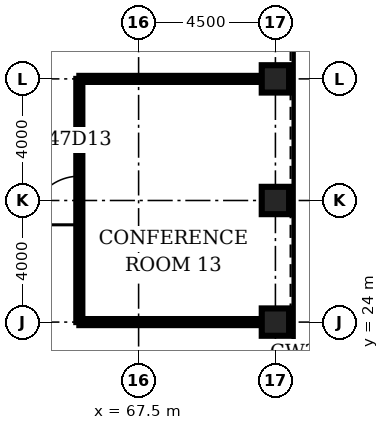
"""IFC4 building model, lengths in metres.
Left out: names, types, materials, properties, quantities, classifications, styles, units other than length and angle.
Written with IfcOpenShell. Run it as: python <this file> out.ifc"""

import sys

from ifc_helpers import new_model, si_unit, direction, frame, frame_2d, origin, origin_2d, place, context, subcontext, project, spatial, rectangle, hollow_rectangle, extrude, element, fill, save


model = new_model("IFC4")
c1 = context("Model", 3, precision=1e-05, world=origin(), true_north=direction((0.0, 1.0)))
c2 = subcontext(c1, "Body", "Model", "MODEL_VIEW")
j1 = project(units=[si_unit("LENGTHUNIT", "METRE"), si_unit("PLANEANGLEUNIT", "RADIAN")], contexts=[c1])
p1 = place(None, origin())
s1 = spatial("IfcSite", under=j1, at=p1, CompositionType="ELEMENT")
p2 = place(p1, origin())
s2 = spatial("IfcBuilding", under=s1, at=p2, CompositionType="ELEMENT")
p3 = place(p2, frame((0.0, 0.0, 211.0)))
s3 = spatial("IfcBuildingStorey", under=s2, at=p3, CompositionType="ELEMENT", Elevation=211.0)
for number, where, z_axis, x_axis in (
    (1, (72.0, 24.0, 0.0), (0.0, 0.0, 1.0), (1.0, 0.0, 0.0)),
    (2, (72.0, 28.0, 0.0), (0.0, 0.0, 1.0), (1.0, 0.0, 0.0)),
    (3, (72.0, 32.0, 0.0), (0.0, 0.0, 1.0), (1.0, 0.0, 0.0)),
):
    element("IfcColumn", number, at=place(p3, frame(where, z_axis=z_axis, x_axis=x_axis)), inside=s3, PredefinedType="COLUMN", context=c2, shape_type="SweptSolid", body=[
        extrude(hollow_rectangle(XDim=0.9, YDim=0.9, WallThickness=0.08, at=origin_2d()), origin(), (0.0, 0.0, 1.0), 4.2),
    ])
for number, where, z_axis, x_axis in (
    (4, (65.55, 24.0, 0.0), (0.0, 0.0, 1.0), (1.0, 0.0, 0.0)),
    (5, (65.55, 32.0, 0.0), (0.0, 0.0, 1.0), (1.0, 0.0, 0.0)),
):
    element("IfcWall", number, at=place(p3, frame(where, z_axis=z_axis, x_axis=x_axis)), inside=s3, PredefinedType="PARTITIONING", context=c2, shape_type="SweptSolid", body=[
        extrude(rectangle(XDim=6.0, YDim=0.2, at=frame_2d((3.0, 0.0))), origin(), (0.0, 0.0, 1.0), 3.0),
    ])
p4 = place(p3, frame((65.55, 24.0, 0.0), z_axis=(0.0, 0.0, 1.0), x_axis=(0.0, 1.0, 0.0)))
e6 = element("IfcWall", 6, at=p4, inside=s3, PredefinedType="PARTITIONING", context=c2, shape_type="SweptSolid", body=[
    extrude(rectangle(XDim=8.0, YDim=0.2, at=frame_2d((4.0, 0.0))), origin(), (0.0, 0.0, 1.0), 3.0),
])
p5 = place(p4, frame((3.2, 0.0, 0.0)))
e7 = element("IfcOpeningElement", 7, at=p5, cuts=e6, PredefinedType="OPENING", context=c2, shape_type="SweptSolid", body=[
    extrude(rectangle(XDim=1.6, YDim=2.1, at=frame_2d((0.8, 1.05))), frame((0.0, 0.11, 0.0), z_axis=(0.0, -1.0, 0.0), x_axis=(1.0, 0.0, 0.0)), (0.0, 0.0, 1.0), 0.22),
])
p6 = place(p5, origin())
e8 = element("IfcDoor", 8, at=p6, inside=s3, OperationType="SINGLE_SWING_LEFT", PredefinedType="DOOR", context=c2, shape_type="SweptSolid", body=[
    extrude(rectangle(XDim=1.6, YDim=2.1, at=frame_2d((0.8, 1.05))), frame((0.0, 0.025, 0.0), z_axis=(0.0, -1.0, 0.0), x_axis=(1.0, 0.0, 0.0)), (0.0, 0.0, 1.0), 0.05),
])
fill(e7, e8)
save(model, sys.argv[1])
